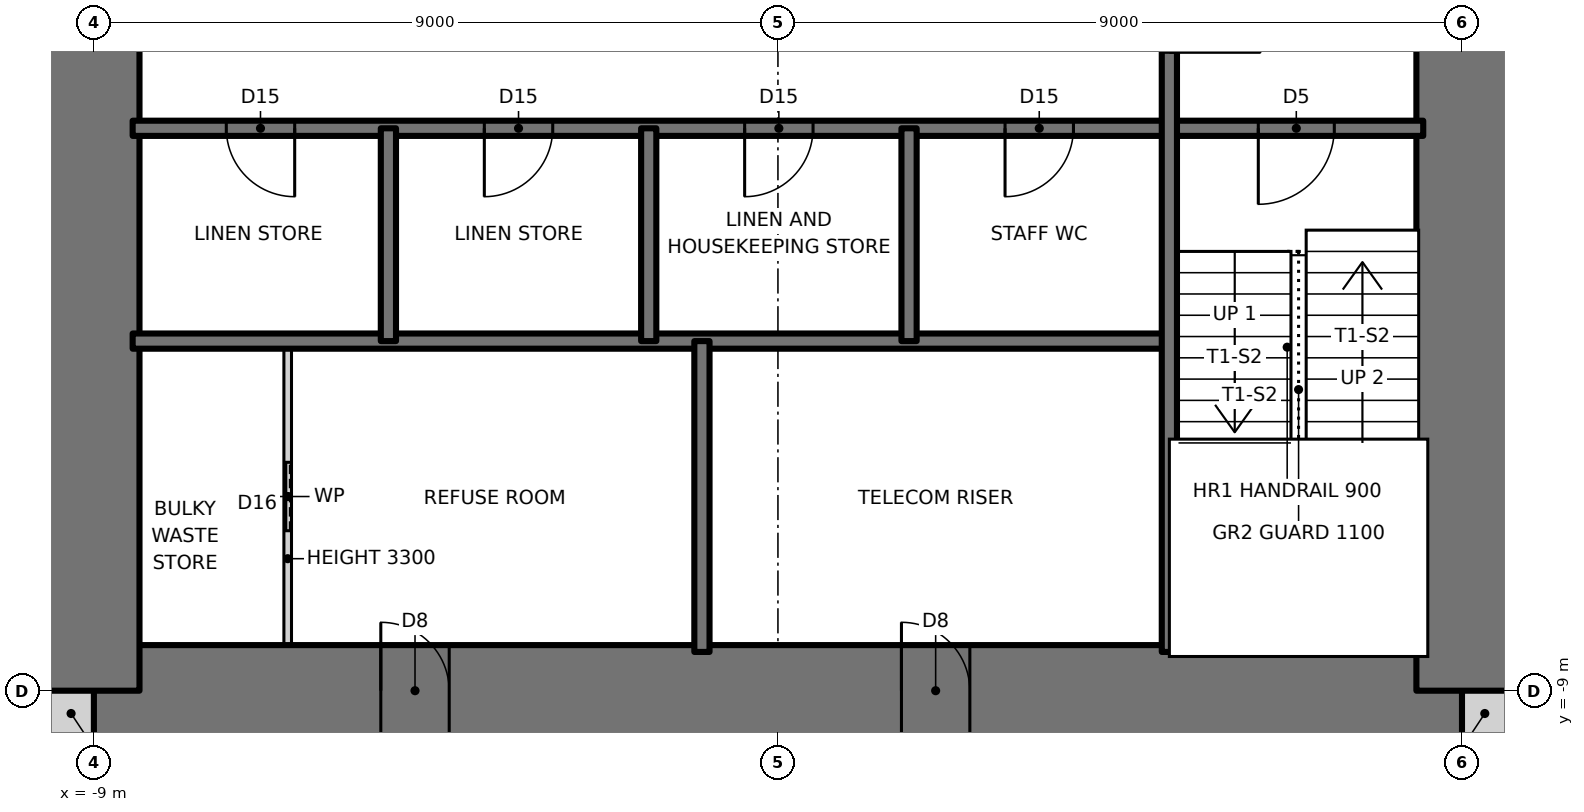
"""IFC4 building model, lengths in metres.
Left out: names, types, materials, properties, quantities, classifications, styles, units other than length and angle.
Written with IfcOpenShell. Run it as: python <this file> out.ifc"""

import sys

from ifc_helpers import new_model, si_unit, direction, frame, frame_2d, origin, place, context, subcontext, project, spatial, rectangle, extrude, element, fill, save


model = new_model("IFC4")
c1 = context("Model", 3, precision=1e-05, world=origin(), true_north=direction((0.0, 1.0)))
c2 = subcontext(c1, "Body", "Model", "MODEL_VIEW")
j1 = project(units=[si_unit("LENGTHUNIT", "METRE"), si_unit("PLANEANGLEUNIT", "RADIAN")], contexts=[c1])
p1 = place(None, origin())
s1 = spatial("IfcSite", under=j1, at=p1, CompositionType="ELEMENT")
p2 = place(p1, origin())
s2 = spatial("IfcBuilding", under=s1, at=p2, CompositionType="ELEMENT")
p3 = place(p2, frame((0.0, 0.0, 202.0)))
s3 = spatial("IfcBuildingStorey", under=s2, at=p3, CompositionType="ELEMENT", Elevation=202.0)
for number, where, z_axis, x_axis in (
    (1, (-9.6, -9.3, 0.0), (0.0, 0.0, 1.0), (1.0, 0.0, 0.0)),
    (2, (9.0, -9.3, 0.0), (0.0, 0.0, 1.0), (1.0, 0.0, 0.0)),
):
    element("IfcWall", number, at=place(p3, frame(where, z_axis=z_axis, x_axis=x_axis)), inside=s3, PredefinedType="SOLIDWALL", context=c2, shape_type="SweptSolid", body=[
        extrude(rectangle(XDim=0.6, YDim=0.6, at=frame_2d((0.3, 0.0))), origin(), (0.0, 0.0, 1.0), 3.5),
    ])
p4 = place(p3, frame((-9.0, -9.0, 0.0), z_axis=(0.0, 0.0, 1.0), x_axis=(1.0, 0.0, 0.0)))
e3 = element("IfcWall", 3, at=p4, inside=s3, PredefinedType="SHEAR", context=c2, shape_type="SweptSolid", body=[
    extrude(rectangle(XDim=18.0, YDim=1.2, at=frame_2d((9.0, 0.0))), origin(), (0.0, 0.0, 1.0), 3.5),
])
p5 = place(p4, frame((3.775, 0.0, 0.0)))
e4 = element("IfcOpeningElement", 4, at=p5, cuts=e3, PredefinedType="OPENING", context=c2, shape_type="SweptSolid", body=[
    extrude(rectangle(XDim=0.9, YDim=2.1, at=frame_2d((0.45, 1.05))), frame((0.0, 0.61, 0.0), z_axis=(0.0, -1.0, 0.0), x_axis=(1.0, 0.0, 0.0)), (0.0, 0.0, 1.0), 1.22),
])
p6 = place(p4, frame((10.625, 0.0, 0.0)))
e5 = element("IfcOpeningElement", 5, at=p6, cuts=e3, PredefinedType="OPENING", context=c2, shape_type="SweptSolid", body=[
    extrude(rectangle(XDim=0.9, YDim=2.1, at=frame_2d((0.45, 1.05))), frame((0.0, 0.61, 0.0), z_axis=(0.0, -1.0, 0.0), x_axis=(1.0, 0.0, 0.0)), (0.0, 0.0, 1.0), 1.22),
])
p7 = place(p3, frame((9.0, -9.0, 0.0), z_axis=(0.0, 0.0, 1.0), x_axis=(0.0, 1.0, 0.0)))
e6 = element("IfcWall", 6, at=p7, inside=s3, PredefinedType="SHEAR", context=c2, shape_type="SweptSolid", body=[
    extrude(rectangle(XDim=18.0, YDim=1.2, at=frame_2d((9.0, 0.0))), origin(), (0.0, 0.0, 1.0), 3.5),
])
p8 = place(p7, frame((8.5, 0.0, 0.0)))
e7 = element("IfcOpeningElement", 7, at=p8, cuts=e6, PredefinedType="OPENING", context=c2, shape_type="SweptSolid", body=[
    extrude(rectangle(XDim=1.0, YDim=2.1, at=frame_2d((0.5, 1.05))), frame((0.0, 0.61, 0.0), z_axis=(0.0, -1.0, 0.0), x_axis=(1.0, 0.0, 0.0)), (0.0, 0.0, 1.0), 1.22),
])
p9 = place(p3, frame((-9.0, 9.0, 0.0), z_axis=(0.0, 0.0, 1.0), x_axis=(0.0, -1.0, 0.0)))
e8 = element("IfcWall", 8, at=p9, inside=s3, PredefinedType="SHEAR", context=c2, shape_type="SweptSolid", body=[
    extrude(rectangle(XDim=18.0, YDim=1.2, at=frame_2d((9.0, 0.0))), origin(), (0.0, 0.0, 1.0), 3.5),
])
p10 = place(p9, frame((8.5, 0.0, 0.0)))
e9 = element("IfcOpeningElement", 9, at=p10, cuts=e8, PredefinedType="OPENING", context=c2, shape_type="SweptSolid", body=[
    extrude(rectangle(XDim=1.0, YDim=2.1, at=frame_2d((0.5, 1.05))), frame((0.0, 0.61, 0.0), z_axis=(0.0, -1.0, 0.0), x_axis=(1.0, 0.0, 0.0)), (0.0, 0.0, 1.0), 1.22),
])
p11 = place(p3, frame((-8.49, -4.4, 0.0), z_axis=(0.0, 0.0, 1.0), x_axis=(1.0, 0.0, 0.0)))
e10 = element("IfcWall", 10, at=p11, inside=s3, PredefinedType="SOLIDWALL", context=c2, shape_type="SweptSolid", body=[
    extrude(rectangle(XDim=13.64, YDim=0.2, at=frame_2d((6.82, 0.0))), origin(), (0.0, 0.0, 1.0), 3.5),
])
p12 = place(p3, frame((-8.49, -1.6, 0.0), z_axis=(0.0, 0.0, 1.0), x_axis=(1.0, 0.0, 0.0)))
e11 = element("IfcWall", 11, at=p12, inside=s3, PredefinedType="SOLIDWALL", context=c2, shape_type="SweptSolid", body=[
    extrude(rectangle(XDim=16.98, YDim=0.2, at=frame_2d((8.49, 0.0))), origin(), (0.0, 0.0, 1.0), 3.5),
])
p13 = place(p12, frame((14.81, 0.0, 0.0)))
e12 = element("IfcOpeningElement", 12, at=p13, cuts=e11, PredefinedType="OPENING", context=c2, shape_type="SweptSolid", body=[
    extrude(rectangle(XDim=1.0, YDim=2.1, at=frame_2d((0.5, 1.05))), frame((0.0, 0.11, 0.0), z_axis=(0.0, -1.0, 0.0), x_axis=(1.0, 0.0, 0.0)), (0.0, 0.0, 1.0), 0.22),
])
p14 = place(p12, frame((1.232, 0.0, 0.0)))
e13 = element("IfcOpeningElement", 13, at=p14, cuts=e11, PredefinedType="OPENING", context=c2, shape_type="SweptSolid", body=[
    extrude(rectangle(XDim=0.9, YDim=2.1, at=frame_2d((0.45, 1.05))), frame((0.0, 0.11, 0.0), z_axis=(0.0, -1.0, 0.0), x_axis=(1.0, 0.0, 0.0)), (0.0, 0.0, 1.0), 0.22),
])
p15 = place(p12, frame((4.627, 0.0, 0.0)))
e14 = element("IfcOpeningElement", 14, at=p15, cuts=e11, PredefinedType="OPENING", context=c2, shape_type="SweptSolid", body=[
    extrude(rectangle(XDim=0.9, YDim=2.1, at=frame_2d((0.45, 1.05))), frame((0.0, 0.11, 0.0), z_axis=(0.0, -1.0, 0.0), x_axis=(1.0, 0.0, 0.0)), (0.0, 0.0, 1.0), 0.22),
])
p16 = place(p12, frame((8.052, 0.0, 0.0)))
e15 = element("IfcOpeningElement", 15, at=p16, cuts=e11, PredefinedType="OPENING", context=c2, shape_type="SweptSolid", body=[
    extrude(rectangle(XDim=0.9, YDim=2.1, at=frame_2d((0.45, 1.05))), frame((0.0, 0.11, 0.0), z_axis=(0.0, -1.0, 0.0), x_axis=(1.0, 0.0, 0.0)), (0.0, 0.0, 1.0), 0.22),
])
p17 = place(p12, frame((11.478, 0.0, 0.0)))
e16 = element("IfcOpeningElement", 16, at=p17, cuts=e11, PredefinedType="OPENING", context=c2, shape_type="SweptSolid", body=[
    extrude(rectangle(XDim=0.9, YDim=2.1, at=frame_2d((0.45, 1.05))), frame((0.0, 0.11, 0.0), z_axis=(0.0, -1.0, 0.0), x_axis=(1.0, 0.0, 0.0)), (0.0, 0.0, 1.0), 0.22),
])
p18 = place(p3, frame((5.15, -8.49, 0.0), z_axis=(0.0, 0.0, 1.0), x_axis=(0.0, 1.0, 0.0)))
e17 = element("IfcWall", 17, at=p18, inside=s3, PredefinedType="SOLIDWALL", context=c2, shape_type="SweptSolid", body=[
    extrude(rectangle(XDim=13.09, YDim=0.2, at=frame_2d((6.545, 0.0))), origin(), (0.0, 0.0, 1.0), 3.5),
])
p19 = place(p18, frame((7.89, 0.0, 0.0)))
e18 = element("IfcOpeningElement", 18, at=p19, cuts=e17, PredefinedType="OPENING", context=c2, shape_type="SweptSolid", body=[
    extrude(rectangle(XDim=1.2, YDim=2.1, at=frame_2d((0.6, 1.05))), frame((0.0, 0.11, 0.0), z_axis=(0.0, -1.0, 0.0), x_axis=(1.0, 0.0, 0.0)), (0.0, 0.0, 1.0), 0.22),
])
p20 = place(p3, frame((1.725, -4.4, 0.0), z_axis=(0.0, 0.0, 1.0), x_axis=(0.0, 1.0, 0.0)))
e19 = element("IfcWall", 19, at=p20, inside=s3, PredefinedType="SOLIDWALL", context=c2, shape_type="SweptSolid", body=[
    extrude(rectangle(XDim=2.8, YDim=0.2, at=frame_2d((1.4, 0.0))), origin(), (0.0, 0.0, 1.0), 3.5),
])
p21 = place(p3, frame((-1.0, -8.49, 0.0), z_axis=(0.0, 0.0, 1.0), x_axis=(0.0, 1.0, 0.0)))
e20 = element("IfcWall", 20, at=p21, inside=s3, PredefinedType="SOLIDWALL", context=c2, shape_type="SweptSolid", body=[
    extrude(rectangle(XDim=4.09, YDim=0.2, at=frame_2d((2.045, 0.0))), origin(), (0.0, 0.0, 1.0), 3.5),
])
for number, where, z_axis, x_axis in (
    (21, (-1.7, -4.4, 0.0), (0.0, 0.0, 1.0), (0.0, 1.0, 0.0)),
    (22, (-5.125, -4.4, 0.0), (0.0, 0.0, 1.0), (0.0, 1.0, 0.0)),
):
    element("IfcWall", number, at=place(p3, frame(where, z_axis=z_axis, x_axis=x_axis)), inside=s3, PredefinedType="SOLIDWALL", context=c2, shape_type="SweptSolid", body=[
        extrude(rectangle(XDim=2.8, YDim=0.2, at=frame_2d((1.4, 0.0))), origin(), (0.0, 0.0, 1.0), 3.5),
    ])
p22 = place(p3, frame((-6.45, -8.49, 0.0), z_axis=(0.0, 0.0, 1.0), x_axis=(0.0, 1.0, 0.0)))
e23 = element("IfcWall", 23, at=p22, inside=s3, PredefinedType="PARTITIONING", context=c2, shape_type="SweptSolid", body=[
    extrude(rectangle(XDim=4.09, YDim=0.1, at=frame_2d((2.045, 0.0))), origin(), (0.0, 0.0, 1.0), 3.3),
])
p23 = place(p22, frame((1.595, 0.0, 0.0)))
e24 = element("IfcOpeningElement", 24, at=p23, cuts=e23, PredefinedType="OPENING", context=c2, shape_type="SweptSolid", body=[
    extrude(rectangle(XDim=0.9, YDim=2.1, at=frame_2d((0.45, 1.05))), frame((0.0, 0.06, 0.0), z_axis=(0.0, -1.0, 0.0), x_axis=(1.0, 0.0, 0.0)), (0.0, 0.0, 1.0), 0.12),
])
p24 = place(p13, frame((1.0, 0.0, 0.0), z_axis=(0.0, 0.0, 1.0), x_axis=(-1.0, 0.0, 0.0)))
e25 = element("IfcDoor", 25, at=p24, inside=s3, OperationType="SINGLE_SWING_RIGHT", PredefinedType="DOOR", context=c2, shape_type="SweptSolid", body=[
    extrude(rectangle(XDim=1.0, YDim=2.1, at=frame_2d((0.5, 1.05))), frame((0.0, 0.025, 0.0), z_axis=(0.0, -1.0, 0.0), x_axis=(1.0, 0.0, 0.0)), (0.0, 0.0, 1.0), 0.05),
])
fill(e12, e25)
p25 = place(p19, frame((1.2, 0.0, 0.0), z_axis=(0.0, 0.0, 1.0), x_axis=(-1.0, 0.0, 0.0)))
e26 = element("IfcDoor", 26, at=p25, inside=s3, OperationType="SINGLE_SWING_RIGHT", PredefinedType="DOOR", context=c2, shape_type="SweptSolid", body=[
    extrude(rectangle(XDim=1.2, YDim=2.1, at=frame_2d((0.6, 1.05))), frame((0.0, 0.025, 0.0), z_axis=(0.0, -1.0, 0.0), x_axis=(1.0, 0.0, 0.0)), (0.0, 0.0, 1.0), 0.05),
])
fill(e18, e26)
p26 = place(p14, frame((0.9, 0.0, 0.0), z_axis=(0.0, 0.0, 1.0), x_axis=(-1.0, 0.0, 0.0)))
e27 = element("IfcDoor", 27, at=p26, inside=s3, OperationType="SINGLE_SWING_LEFT", PredefinedType="DOOR", context=c2, shape_type="SweptSolid", body=[
    extrude(rectangle(XDim=0.9, YDim=2.1, at=frame_2d((0.45, 1.05))), frame((0.0, 0.025, 0.0), z_axis=(0.0, -1.0, 0.0), x_axis=(1.0, 0.0, 0.0)), (0.0, 0.0, 1.0), 0.05),
])
fill(e13, e27)
p27 = place(p15, frame((0.9, 0.0, 0.0), z_axis=(0.0, 0.0, 1.0), x_axis=(-1.0, 0.0, 0.0)))
e28 = element("IfcDoor", 28, at=p27, inside=s3, OperationType="SINGLE_SWING_RIGHT", PredefinedType="DOOR", context=c2, shape_type="SweptSolid", body=[
    extrude(rectangle(XDim=0.9, YDim=2.1, at=frame_2d((0.45, 1.05))), frame((0.0, 0.025, 0.0), z_axis=(0.0, -1.0, 0.0), x_axis=(1.0, 0.0, 0.0)), (0.0, 0.0, 1.0), 0.05),
])
fill(e14, e28)
p28 = place(p16, frame((0.9, 0.0, 0.0), z_axis=(0.0, 0.0, 1.0), x_axis=(-1.0, 0.0, 0.0)))
e29 = element("IfcDoor", 29, at=p28, inside=s3, OperationType="SINGLE_SWING_RIGHT", PredefinedType="DOOR", context=c2, shape_type="SweptSolid", body=[
    extrude(rectangle(XDim=0.9, YDim=2.1, at=frame_2d((0.45, 1.05))), frame((0.0, 0.025, 0.0), z_axis=(0.0, -1.0, 0.0), x_axis=(1.0, 0.0, 0.0)), (0.0, 0.0, 1.0), 0.05),
])
fill(e15, e29)
p29 = place(p17, frame((0.9, 0.0, 0.0), z_axis=(0.0, 0.0, 1.0), x_axis=(-1.0, 0.0, 0.0)))
e30 = element("IfcDoor", 30, at=p29, inside=s3, OperationType="SINGLE_SWING_RIGHT", PredefinedType="DOOR", context=c2, shape_type="SweptSolid", body=[
    extrude(rectangle(XDim=0.9, YDim=2.1, at=frame_2d((0.45, 1.05))), frame((0.0, 0.025, 0.0), z_axis=(0.0, -1.0, 0.0), x_axis=(1.0, 0.0, 0.0)), (0.0, 0.0, 1.0), 0.05),
])
fill(e16, e30)
p30 = place(p23, origin())
e31 = element("IfcDoor", 31, at=p30, inside=s3, OperationType="SLIDING_TO_LEFT", PredefinedType="DOOR", context=c2, shape_type="SweptSolid", body=[
    extrude(rectangle(XDim=0.9, YDim=2.1, at=frame_2d((0.45, 1.05))), frame((0.0, 0.025, 0.0), z_axis=(0.0, -1.0, 0.0), x_axis=(1.0, 0.0, 0.0)), (0.0, 0.0, 1.0), 0.05),
])
fill(e24, e31)
p31 = place(p5, origin())
e32 = element("IfcDoor", 32, at=p31, inside=s3, OperationType="SINGLE_SWING_LEFT", PredefinedType="DOOR", context=c2, shape_type="SweptSolid", body=[
    extrude(rectangle(XDim=0.9, YDim=2.1, at=frame_2d((0.45, 1.05))), frame((0.0, 0.025, 0.0), z_axis=(0.0, -1.0, 0.0), x_axis=(1.0, 0.0, 0.0)), (0.0, 0.0, 1.0), 0.05),
])
fill(e4, e32)
p32 = place(p6, origin())
e33 = element("IfcDoor", 33, at=p32, inside=s3, OperationType="SINGLE_SWING_LEFT", PredefinedType="DOOR", context=c2, shape_type="SweptSolid", body=[
    extrude(rectangle(XDim=0.9, YDim=2.1, at=frame_2d((0.45, 1.05))), frame((0.0, 0.025, 0.0), z_axis=(0.0, -1.0, 0.0), x_axis=(1.0, 0.0, 0.0)), (0.0, 0.0, 1.0), 0.05),
])
fill(e5, e33)
save(model, sys.argv[1])
